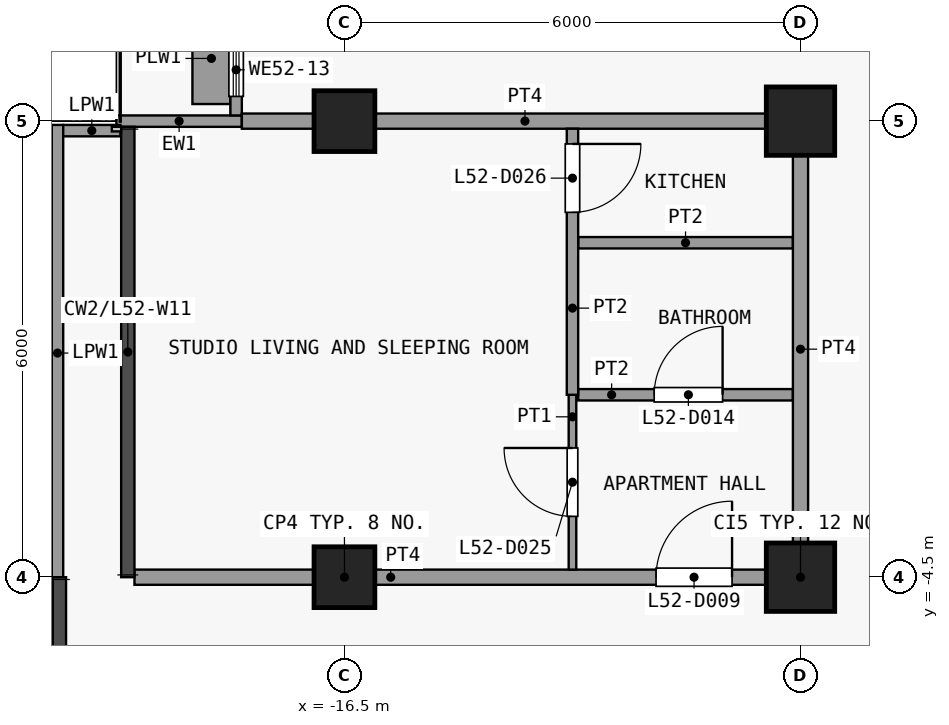
"""IFC4 building model, lengths in metres.
Left out: names, types, materials, properties, quantities, classifications, styles, units other than length and angle.
Written with IfcOpenShell. Run it as: python <this file> out.ifc"""

import sys

from ifc_helpers import new_model, si_unit, direction, frame, frame_2d, origin, origin_2d, place, context, subcontext, project, spatial, rectangle, extrude, element, fill, save


model = new_model("IFC4")
c1 = context("Model", 3, precision=1e-05, world=origin(), true_north=direction((0.0, 1.0)))
c2 = subcontext(c1, "Body", "Model", "MODEL_VIEW")
j1 = project(units=[si_unit("LENGTHUNIT", "METRE"), si_unit("PLANEANGLEUNIT", "RADIAN")], contexts=[c1])
p1 = place(None, origin())
s1 = spatial("IfcSite", under=j1, at=p1, CompositionType="ELEMENT")
p2 = place(p1, origin())
s2 = spatial("IfcBuilding", under=s1, at=p2, CompositionType="ELEMENT")
p3 = place(p2, frame((0.0, 0.0, 208.7)))
s3 = spatial("IfcBuildingStorey", under=s2, at=p3, CompositionType="ELEMENT", Elevation=208.7)
for number, where, z_axis, x_axis in (
    (1, (-16.5, -4.5, 0.0), (0.0, 0.0, 1.0), (1.0, 0.0, 0.0)),
    (2, (-16.5, 1.5, 0.0), (0.0, 0.0, 1.0), (1.0, 0.0, 0.0)),
):
    element("IfcColumn", number, at=place(p3, frame(where, z_axis=z_axis, x_axis=x_axis)), inside=s3, PredefinedType="COLUMN", context=c2, shape_type="SweptSolid", body=[
        extrude(rectangle(XDim=0.8, YDim=0.8, at=origin_2d()), origin(), (0.0, 0.0, 1.0), 3.6),
    ])
for number, where, z_axis, x_axis in (
    (3, (-10.5, -4.5, 0.0), (0.0, 0.0, 1.0), (1.0, 0.0, 0.0)),
    (4, (-10.5, 1.5, 0.0), (0.0, 0.0, 1.0), (1.0, 0.0, 0.0)),
):
    element("IfcColumn", number, at=place(p3, frame(where, z_axis=z_axis, x_axis=x_axis)), inside=s3, PredefinedType="COLUMN", context=c2, shape_type="SweptSolid", body=[
        extrude(rectangle(XDim=0.9, YDim=0.9, at=origin_2d()), origin(), (0.0, 0.0, 1.0), 3.6),
    ])
p4 = place(p3, frame((-17.85, 1.5, 0.0), z_axis=(0.0, 0.0, 1.0), x_axis=(-1.0, 0.0, 0.0)))
e5 = element("IfcWall", 5, at=p4, inside=s3, PredefinedType="SOLIDWALL", context=c2, shape_type="SweptSolid", body=[
    extrude(rectangle(XDim=1.65, YDim=0.15, at=frame_2d((0.825, 0.0))), origin(), (0.0, 0.0, 1.0), 3.3),
])
p5 = place(p3, frame((-17.925, 1.575, 0.0), z_axis=(0.0, 0.0, 1.0), x_axis=(0.0, 1.0, 0.0)))
e6 = element("IfcWall", 6, at=p5, inside=s3, PredefinedType="SOLIDWALL", context=c2, shape_type="SweptSolid", body=[
    extrude(rectangle(XDim=5.85, YDim=0.15, at=frame_2d((2.925, 0.0))), origin(), (0.0, 0.0, 1.0), 3.3),
])
p6 = place(p5, frame((1.2, 0.0, 0.0)))
e7 = element("IfcOpeningElement", 7, at=p6, cuts=e6, PredefinedType="OPENING", context=c2, shape_type="SweptSolid", body=[
    extrude(rectangle(XDim=1.2, YDim=2.4, at=frame_2d((0.6, 1.2))), frame((0.0, 0.085, 0.0), z_axis=(0.0, -1.0, 0.0), x_axis=(1.0, 0.0, 0.0)), (0.0, 0.0, 1.0), 0.17),
])
p7 = place(p5, frame((0.25, 0.0, 0.9)))
e8 = element("IfcOpeningElement", 8, at=p7, cuts=e6, PredefinedType="OPENING", context=c2, shape_type="SweptSolid", body=[
    extrude(rectangle(XDim=0.7, YDim=2.1, at=frame_2d((0.35, 1.05))), frame((0.0, 0.085, 0.0), z_axis=(0.0, -1.0, 0.0), x_axis=(1.0, 0.0, 0.0)), (0.0, 0.0, 1.0), 0.17),
])
p8 = place(p5, frame((3.225, 0.0, 0.9)))
e9 = element("IfcOpeningElement", 9, at=p8, cuts=e6, PredefinedType="OPENING", context=c2, shape_type="SweptSolid", body=[
    extrude(rectangle(XDim=1.8, YDim=2.1, at=frame_2d((0.9, 1.05))), frame((0.0, 0.085, 0.0), z_axis=(0.0, -1.0, 0.0), x_axis=(1.0, 0.0, 0.0)), (0.0, 0.0, 1.0), 0.17),
])
p9 = place(p3, frame((-18.25, 1.725, 0.0), z_axis=(0.0, 0.0, 1.0), x_axis=(0.0, 1.0, 0.0)))
e10 = element("IfcWall", 10, at=p9, inside=s3, PredefinedType="USERDEFINED", context=c2, shape_type="SweptSolid", body=[
    extrude(rectangle(XDim=1.2, YDim=0.5, at=frame_2d((0.6, 0.0))), origin(), (0.0, 0.0, 1.0), 0.9),
])
p10 = place(p3, frame((-20.275, -4.552, 0.0), z_axis=(0.0, 0.0, 1.0), x_axis=(0.0, 1.0, 0.0)))
e11 = element("IfcWall", 11, at=p10, inside=s3, PredefinedType="PARAPET", context=c2, shape_type="SweptSolid", body=[
    extrude(rectangle(XDim=6.002, YDim=0.15, at=frame_2d((3.001, 0.0))), origin(), (0.0, 0.0, 1.0), 1.15),
])
p11 = place(p3, frame((-20.2, 1.375, 0.0), z_axis=(0.0, 0.0, 1.0), x_axis=(1.0, 0.0, 0.0)))
e12 = element("IfcWall", 12, at=p11, inside=s3, PredefinedType="PARAPET", context=c2, shape_type="SweptSolid", body=[
    extrude(rectangle(XDim=0.752, YDim=0.15, at=frame_2d((0.376, 0.0))), origin(), (0.0, 0.0, 1.0), 1.15),
])
p12 = place(p3, frame((-19.262, -4.5, 0.0), z_axis=(0.0, 0.0, 1.0), x_axis=(1.0, 0.0, 0.0)))
e13 = element("IfcWall", 13, at=p12, inside=s3, PredefinedType="PARTITIONING", context=c2, shape_type="SweptSolid", body=[
    extrude(rectangle(XDim=8.863, YDim=0.2, at=frame_2d((4.431, 0.0))), origin(), (0.0, 0.0, 1.0), 3.3),
])
p13 = place(p12, frame((6.862, 0.0, 0.0)))
e14 = element("IfcOpeningElement", 14, at=p13, cuts=e13, PredefinedType="OPENING", context=c2, shape_type="SweptSolid", body=[
    extrude(rectangle(XDim=1.0, YDim=2.1, at=frame_2d((0.5, 1.05))), frame((0.0, 0.11, 0.0), z_axis=(0.0, -1.0, 0.0), x_axis=(1.0, 0.0, 0.0)), (0.0, 0.0, 1.0), 0.22),
])
p14 = place(p3, frame((-13.425, -2.1, 0.0), z_axis=(0.0, 0.0, 1.0), x_axis=(1.0, 0.0, 0.0)))
e15 = element("IfcWall", 15, at=p14, inside=s3, PredefinedType="PARTITIONING", context=c2, shape_type="SweptSolid", body=[
    extrude(rectangle(XDim=2.825, YDim=0.15, at=frame_2d((1.413, 0.0))), origin(), (0.0, 0.0, 1.0), 3.3),
])
p15 = place(p14, frame((1.0, 0.0, 0.0)))
e16 = element("IfcOpeningElement", 16, at=p15, cuts=e15, PredefinedType="OPENING", context=c2, shape_type="SweptSolid", body=[
    extrude(rectangle(XDim=0.9, YDim=2.1, at=frame_2d((0.45, 1.05))), frame((0.0, 0.085, 0.0), z_axis=(0.0, -1.0, 0.0), x_axis=(1.0, 0.0, 0.0)), (0.0, 0.0, 1.0), 0.17),
])
p16 = place(p3, frame((-13.425, -0.1, 0.0), z_axis=(0.0, 0.0, 1.0), x_axis=(1.0, 0.0, 0.0)))
e17 = element("IfcWall", 17, at=p16, inside=s3, PredefinedType="PARTITIONING", context=c2, shape_type="SweptSolid", body=[
    extrude(rectangle(XDim=2.825, YDim=0.15, at=frame_2d((1.413, 0.0))), origin(), (0.0, 0.0, 1.0), 3.3),
])
p17 = place(p3, frame((-17.85, 1.5, 0.0), z_axis=(0.0, 0.0, 1.0), x_axis=(1.0, 0.0, 0.0)))
e18 = element("IfcWall", 18, at=p17, inside=s3, PredefinedType="PARTITIONING", context=c2, shape_type="SweptSolid", body=[
    extrude(rectangle(XDim=7.45, YDim=0.2, at=frame_2d((3.725, 0.0))), origin(), (0.0, 0.0, 1.0), 3.3),
])
p18 = place(p3, frame((-13.5, -4.4, 0.0), z_axis=(0.0, 0.0, 1.0), x_axis=(0.0, 1.0, 0.0)))
e19 = element("IfcWall", 19, at=p18, inside=s3, PredefinedType="PARTITIONING", context=c2, shape_type="SweptSolid", body=[
    extrude(rectangle(XDim=2.3, YDim=0.1, at=frame_2d((1.15, 0.0))), origin(), (0.0, 0.0, 1.0), 3.3),
])
p19 = place(p18, frame((0.7, 0.0, 0.0)))
e20 = element("IfcOpeningElement", 20, at=p19, cuts=e19, PredefinedType="OPENING", context=c2, shape_type="SweptSolid", body=[
    extrude(rectangle(XDim=0.9, YDim=2.1, at=frame_2d((0.45, 1.05))), frame((0.0, 0.06, 0.0), z_axis=(0.0, -1.0, 0.0), x_axis=(1.0, 0.0, 0.0)), (0.0, 0.0, 1.0), 0.12),
])
p20 = place(p3, frame((-13.5, -2.1, 0.0), z_axis=(0.0, 0.0, 1.0), x_axis=(0.0, 1.0, 0.0)))
e21 = element("IfcWall", 21, at=p20, inside=s3, PredefinedType="PARTITIONING", context=c2, shape_type="SweptSolid", body=[
    extrude(rectangle(XDim=3.5, YDim=0.15, at=frame_2d((1.75, 0.0))), origin(), (0.0, 0.0, 1.0), 3.3),
])
p21 = place(p20, frame((2.4, 0.0, 0.0)))
e22 = element("IfcOpeningElement", 22, at=p21, cuts=e21, PredefinedType="OPENING", context=c2, shape_type="SweptSolid", body=[
    extrude(rectangle(XDim=0.9, YDim=2.1, at=frame_2d((0.45, 1.05))), frame((0.0, 0.085, 0.0), z_axis=(0.0, -1.0, 0.0), x_axis=(1.0, 0.0, 0.0)), (0.0, 0.0, 1.0), 0.17),
])
p22 = place(p3, frame((-10.5, -4.4, 0.0), z_axis=(0.0, 0.0, 1.0), x_axis=(0.0, 1.0, 0.0)))
e23 = element("IfcWall", 23, at=p22, inside=s3, PredefinedType="PARTITIONING", context=c2, shape_type="SweptSolid", body=[
    extrude(rectangle(XDim=5.8, YDim=0.2, at=frame_2d((2.9, 0.0))), origin(), (0.0, 0.0, 1.0), 3.3),
])
p23 = place(p7, origin())
e24 = element("IfcWindow", 24, at=p23, inside=s3, PartitioningType="SINGLE_PANEL", PredefinedType="WINDOW", context=c2, shape_type="SweptSolid", body=[
    extrude(rectangle(XDim=0.7, YDim=2.1, at=frame_2d((0.35, 1.05))), frame((0.0, 0.03, 0.0), z_axis=(0.0, -1.0, 0.0), x_axis=(1.0, 0.0, 0.0)), (0.0, 0.0, 1.0), 0.06),
])
fill(e8, e24)
p24 = place(p13, origin())
e25 = element("IfcDoor", 25, at=p24, inside=s3, OperationType="SINGLE_SWING_LEFT", PredefinedType="DOOR", context=c2, shape_type="SweptSolid", body=[
    extrude(rectangle(XDim=1.0, YDim=2.1, at=frame_2d((0.5, 1.05))), frame((0.0, 0.025, 0.0), z_axis=(0.0, -1.0, 0.0), x_axis=(1.0, 0.0, 0.0)), (0.0, 0.0, 1.0), 0.05),
])
fill(e14, e25)
p25 = place(p15, origin())
e26 = element("IfcDoor", 26, at=p25, inside=s3, OperationType="SINGLE_SWING_LEFT", PredefinedType="DOOR", context=c2, shape_type="SweptSolid", body=[
    extrude(rectangle(XDim=0.9, YDim=2.1, at=frame_2d((0.45, 1.05))), frame((0.0, 0.025, 0.0), z_axis=(0.0, -1.0, 0.0), x_axis=(1.0, 0.0, 0.0)), (0.0, 0.0, 1.0), 0.05),
])
fill(e16, e26)
p26 = place(p19, origin())
e27 = element("IfcDoor", 27, at=p26, inside=s3, OperationType="SINGLE_SWING_LEFT", PredefinedType="DOOR", context=c2, shape_type="SweptSolid", body=[
    extrude(rectangle(XDim=0.9, YDim=2.1, at=frame_2d((0.45, 1.05))), frame((0.0, 0.025, 0.0), z_axis=(0.0, -1.0, 0.0), x_axis=(1.0, 0.0, 0.0)), (0.0, 0.0, 1.0), 0.05),
])
fill(e20, e27)
p27 = place(p21, origin())
e28 = element("IfcDoor", 28, at=p27, inside=s3, OperationType="SINGLE_SWING_RIGHT", PredefinedType="DOOR", context=c2, shape_type="SweptSolid", body=[
    extrude(rectangle(XDim=0.9, YDim=2.1, at=frame_2d((0.45, 1.05))), frame((0.0, 0.025, 0.0), z_axis=(0.0, -1.0, 0.0), x_axis=(1.0, 0.0, 0.0)), (0.0, 0.0, 1.0), 0.05),
])
fill(e22, e28)
save(model, sys.argv[1])
